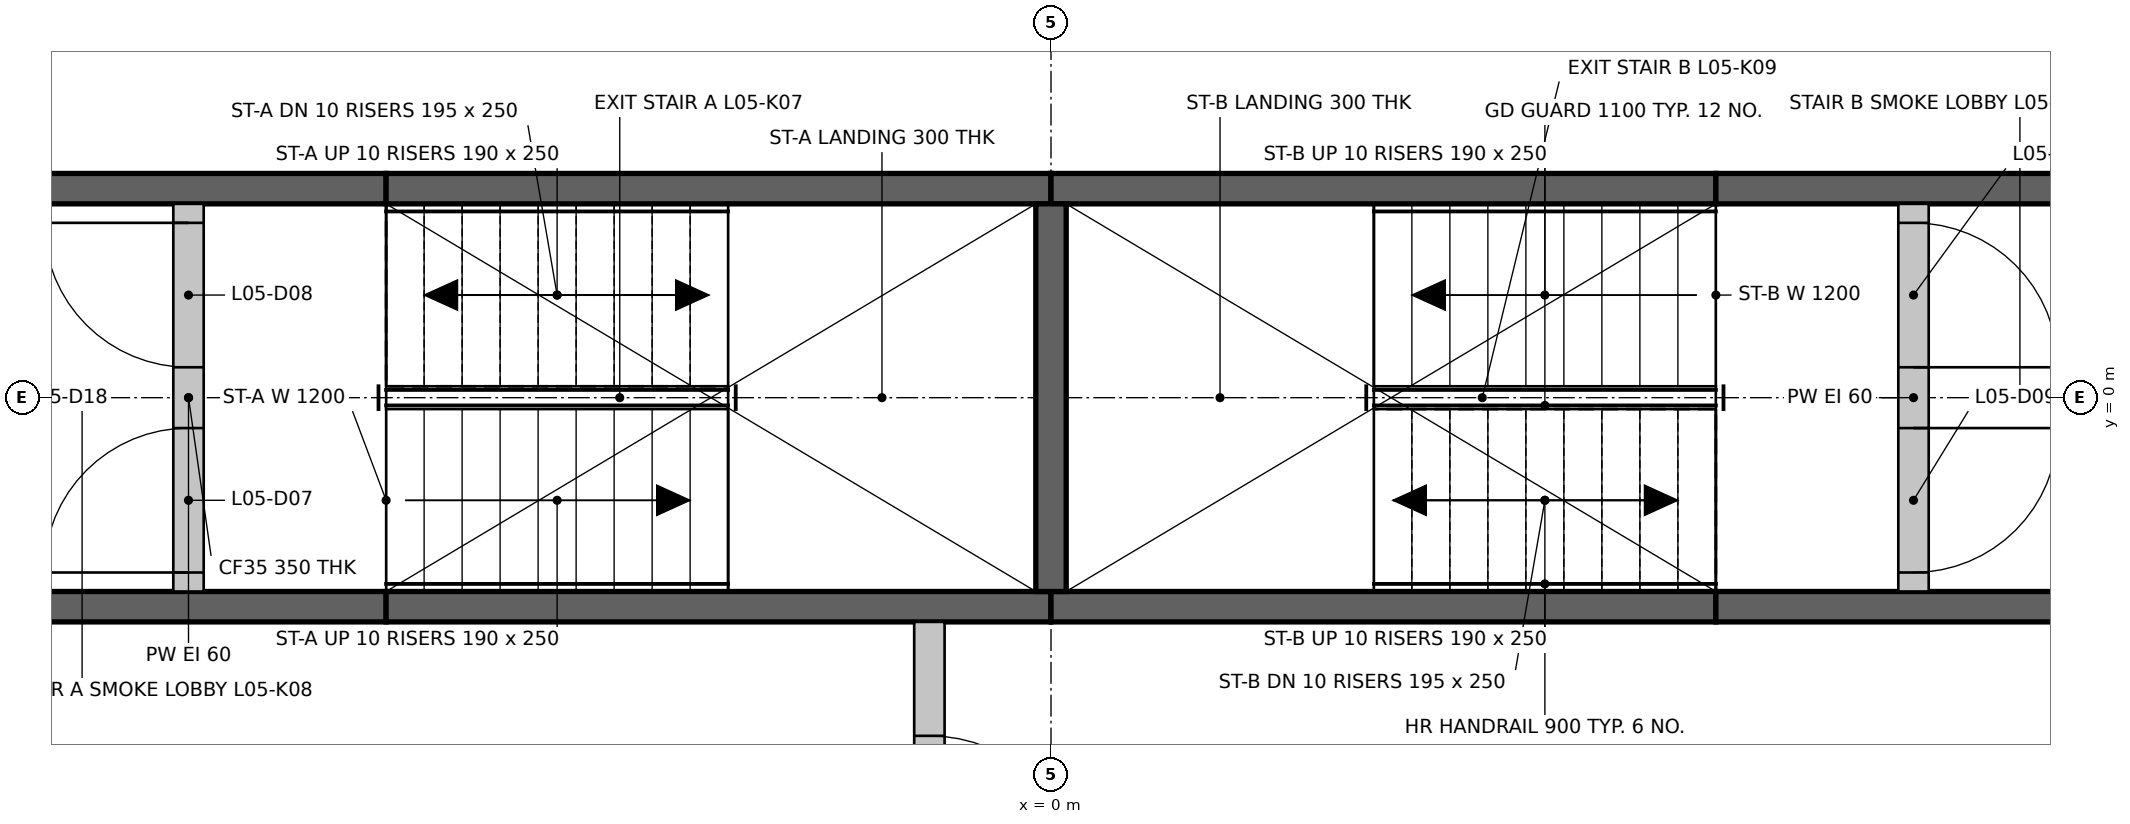
"""IFC4 building model, lengths in metres.
Left out: names, types, materials, properties, quantities, classifications, styles, units other than length and angle.
Written with IfcOpenShell. Run it as: python <this file> out.ifc"""

import sys

from ifc_helpers import new_model, si_unit, direction, frame, frame_2d, origin, place, context, subcontext, project, spatial, rectangle, extrude, element, fill, save


model = new_model("IFC4")
c1 = context("Model", 3, precision=1e-05, world=origin(), true_north=direction((0.0, 1.0)))
c2 = subcontext(c1, "Body", "Model", "MODEL_VIEW")
j1 = project(units=[si_unit("LENGTHUNIT", "METRE"), si_unit("PLANEANGLEUNIT", "RADIAN")], contexts=[c1])
p1 = place(None, origin())
s1 = spatial("IfcSite", under=j1, at=p1, CompositionType="ELEMENT")
p2 = place(p1, origin())
s2 = spatial("IfcBuilding", under=s1, at=p2, CompositionType="ELEMENT")
p3 = place(p2, frame((0.0, 0.0, 22.4)))
s3 = spatial("IfcBuildingStorey", under=s2, at=p3, CompositionType="ELEMENT", Elevation=22.4)
p4 = place(p3, frame((-6.974, -1.375, 0.0), z_axis=(0.0, 0.0, 1.0), x_axis=(1.0, 0.0, 0.0)))
e1 = element("IfcWall", 1, at=p4, inside=s3, PredefinedType="SHEAR", context=c2, shape_type="SweptSolid", body=[
    extrude(rectangle(XDim=2.6, YDim=0.2, at=frame_2d((1.3, 0.0))), origin(), (0.0, 0.0, 1.0), 3.45),
])
for number, where, z_axis, x_axis in (
    (2, (-4.374, -1.375, 0.0), (0.0, 0.0, 1.0), (1.0, 0.0, 0.0)),
    (3, (0.0, -1.375, 0.0), (0.0, 0.0, 1.0), (1.0, 0.0, 0.0)),
):
    element("IfcWall", number, at=place(p3, frame(where, z_axis=z_axis, x_axis=x_axis)), inside=s3, PredefinedType="SHEAR", context=c2, shape_type="SweptSolid", body=[
        extrude(rectangle(XDim=4.374, YDim=0.2, at=frame_2d((2.187, 0.0))), origin(), (0.0, 0.0, 1.0), 3.45),
    ])
for number, where, z_axis, x_axis in (
    (4, (4.374, -1.375, 0.0), (0.0, 0.0, 1.0), (1.0, 0.0, 0.0)),
    (5, (-6.974, 1.375, 0.0), (0.0, 0.0, 1.0), (1.0, 0.0, 0.0)),
):
    element("IfcWall", number, at=place(p3, frame(where, z_axis=z_axis, x_axis=x_axis)), inside=s3, PredefinedType="SHEAR", context=c2, shape_type="SweptSolid", body=[
        extrude(rectangle(XDim=2.6, YDim=0.2, at=frame_2d((1.3, 0.0))), origin(), (0.0, 0.0, 1.0), 3.45),
    ])
for number, where, z_axis, x_axis in (
    (6, (-4.374, 1.375, 0.0), (0.0, 0.0, 1.0), (1.0, 0.0, 0.0)),
    (7, (0.0, 1.375, 0.0), (0.0, 0.0, 1.0), (1.0, 0.0, 0.0)),
):
    element("IfcWall", number, at=place(p3, frame(where, z_axis=z_axis, x_axis=x_axis)), inside=s3, PredefinedType="SHEAR", context=c2, shape_type="SweptSolid", body=[
        extrude(rectangle(XDim=4.374, YDim=0.2, at=frame_2d((2.187, 0.0))), origin(), (0.0, 0.0, 1.0), 3.45),
    ])
p5 = place(p3, frame((4.374, 1.375, 0.0), z_axis=(0.0, 0.0, 1.0), x_axis=(1.0, 0.0, 0.0)))
e8 = element("IfcWall", 8, at=p5, inside=s3, PredefinedType="SHEAR", context=c2, shape_type="SweptSolid", body=[
    extrude(rectangle(XDim=2.6, YDim=0.2, at=frame_2d((1.3, 0.0))), origin(), (0.0, 0.0, 1.0), 3.45),
])
p6 = place(p3, frame((0.0, -1.275, 0.0), z_axis=(0.0, 0.0, 1.0), x_axis=(0.0, 1.0, 0.0)))
e9 = element("IfcWall", 9, at=p6, inside=s3, PredefinedType="SHEAR", context=c2, shape_type="SweptSolid", body=[
    extrude(rectangle(XDim=2.55, YDim=0.2, at=frame_2d((1.275, 0.0))), origin(), (0.0, 0.0, 1.0), 3.45),
])
p7 = place(p3, frame((-0.8, -3.974, 0.0), z_axis=(0.0, 0.0, 1.0), x_axis=(0.0, 1.0, 0.0)))
e10 = element("IfcWall", 10, at=p7, inside=s3, PredefinedType="PARTITIONING", context=c2, shape_type="SweptSolid", body=[
    extrude(rectangle(XDim=2.499, YDim=0.2, at=frame_2d((1.25, 0.0))), origin(), (0.0, 0.0, 1.0), 3.45),
])
p8 = place(p7, frame((0.75, 0.0, 0.0)))
e11 = element("IfcOpeningElement", 11, at=p8, cuts=e10, PredefinedType="OPENING", context=c2, shape_type="SweptSolid", body=[
    extrude(rectangle(XDim=1.0, YDim=2.1, at=frame_2d((0.5, 1.05))), frame((0.0, 0.11, 0.0), z_axis=(0.0, -1.0, 0.0), x_axis=(1.0, 0.0, 0.0)), (0.0, 0.0, 1.0), 0.22),
])
p9 = place(p3, frame((-5.674, -1.275, 0.0), z_axis=(0.0, 0.0, 1.0), x_axis=(0.0, 1.0, 0.0)))
e12 = element("IfcWall", 12, at=p9, inside=s3, PredefinedType="PARTITIONING", context=c2, shape_type="SweptSolid", body=[
    extrude(rectangle(XDim=2.55, YDim=0.2, at=frame_2d((1.275, 0.0))), origin(), (0.0, 0.0, 1.0), 3.45),
])
p10 = place(p9, frame((0.125, 0.0, 0.0)))
e13 = element("IfcOpeningElement", 13, at=p10, cuts=e12, PredefinedType="OPENING", context=c2, shape_type="SweptSolid", body=[
    extrude(rectangle(XDim=0.95, YDim=2.1, at=frame_2d((0.475, 1.05))), frame((0.0, 0.11, 0.0), z_axis=(0.0, -1.0, 0.0), x_axis=(1.0, 0.0, 0.0)), (0.0, 0.0, 1.0), 0.22),
])
p11 = place(p9, frame((1.475, 0.0, 0.0)))
e14 = element("IfcOpeningElement", 14, at=p11, cuts=e12, PredefinedType="OPENING", context=c2, shape_type="SweptSolid", body=[
    extrude(rectangle(XDim=0.95, YDim=2.1, at=frame_2d((0.475, 1.05))), frame((0.0, 0.11, 0.0), z_axis=(0.0, -1.0, 0.0), x_axis=(1.0, 0.0, 0.0)), (0.0, 0.0, 1.0), 0.22),
])
p12 = place(p3, frame((5.674, -1.275, 0.0), z_axis=(0.0, 0.0, 1.0), x_axis=(0.0, 1.0, 0.0)))
e15 = element("IfcWall", 15, at=p12, inside=s3, PredefinedType="PARTITIONING", context=c2, shape_type="SweptSolid", body=[
    extrude(rectangle(XDim=2.55, YDim=0.2, at=frame_2d((1.275, 0.0))), origin(), (0.0, 0.0, 1.0), 3.45),
])
p13 = place(p12, frame((0.125, 0.0, 0.0)))
e16 = element("IfcOpeningElement", 16, at=p13, cuts=e15, PredefinedType="OPENING", context=c2, shape_type="SweptSolid", body=[
    extrude(rectangle(XDim=0.95, YDim=2.1, at=frame_2d((0.475, 1.05))), frame((0.0, 0.11, 0.0), z_axis=(0.0, -1.0, 0.0), x_axis=(1.0, 0.0, 0.0)), (0.0, 0.0, 1.0), 0.22),
])
p14 = place(p12, frame((1.475, 0.0, 0.0)))
e17 = element("IfcOpeningElement", 17, at=p14, cuts=e15, PredefinedType="OPENING", context=c2, shape_type="SweptSolid", body=[
    extrude(rectangle(XDim=0.95, YDim=2.1, at=frame_2d((0.475, 1.05))), frame((0.0, 0.11, 0.0), z_axis=(0.0, -1.0, 0.0), x_axis=(1.0, 0.0, 0.0)), (0.0, 0.0, 1.0), 0.22),
])
p15 = place(p10, origin())
e18 = element("IfcDoor", 18, at=p15, inside=s3, OperationType="SINGLE_SWING_LEFT", PredefinedType="DOOR", context=c2, shape_type="SweptSolid", body=[
    extrude(rectangle(XDim=0.95, YDim=2.1, at=frame_2d((0.475, 1.05))), frame((0.0, 0.025, 0.0), z_axis=(0.0, -1.0, 0.0), x_axis=(1.0, 0.0, 0.0)), (0.0, 0.0, 1.0), 0.05),
])
fill(e13, e18)
p16 = place(p11, origin())
e19 = element("IfcDoor", 19, at=p16, inside=s3, OperationType="SINGLE_SWING_RIGHT", PredefinedType="DOOR", context=c2, shape_type="SweptSolid", body=[
    extrude(rectangle(XDim=0.95, YDim=2.1, at=frame_2d((0.475, 1.05))), frame((0.0, 0.025, 0.0), z_axis=(0.0, -1.0, 0.0), x_axis=(1.0, 0.0, 0.0)), (0.0, 0.0, 1.0), 0.05),
])
fill(e14, e19)
p17 = place(p13, frame((0.95, 0.0, 0.0), z_axis=(0.0, 0.0, 1.0), x_axis=(-1.0, 0.0, 0.0)))
e20 = element("IfcDoor", 20, at=p17, inside=s3, OperationType="SINGLE_SWING_RIGHT", PredefinedType="DOOR", context=c2, shape_type="SweptSolid", body=[
    extrude(rectangle(XDim=0.95, YDim=2.1, at=frame_2d((0.475, 1.05))), frame((0.0, 0.025, 0.0), z_axis=(0.0, -1.0, 0.0), x_axis=(1.0, 0.0, 0.0)), (0.0, 0.0, 1.0), 0.05),
])
fill(e16, e20)
p18 = place(p14, frame((0.95, 0.0, 0.0), z_axis=(0.0, 0.0, 1.0), x_axis=(-1.0, 0.0, 0.0)))
e21 = element("IfcDoor", 21, at=p18, inside=s3, OperationType="SINGLE_SWING_LEFT", PredefinedType="DOOR", context=c2, shape_type="SweptSolid", body=[
    extrude(rectangle(XDim=0.95, YDim=2.1, at=frame_2d((0.475, 1.05))), frame((0.0, 0.025, 0.0), z_axis=(0.0, -1.0, 0.0), x_axis=(1.0, 0.0, 0.0)), (0.0, 0.0, 1.0), 0.05),
])
fill(e17, e21)
p19 = place(p8, frame((1.0, 0.0, 0.0), z_axis=(0.0, 0.0, 1.0), x_axis=(-1.0, 0.0, 0.0)))
e22 = element("IfcDoor", 22, at=p19, inside=s3, OperationType="SINGLE_SWING_LEFT", PredefinedType="DOOR", context=c2, shape_type="SweptSolid", body=[
    extrude(rectangle(XDim=1.0, YDim=2.1, at=frame_2d((0.5, 1.05))), frame((0.0, 0.025, 0.0), z_axis=(0.0, -1.0, 0.0), x_axis=(1.0, 0.0, 0.0)), (0.0, 0.0, 1.0), 0.05),
])
fill(e11, e22)
save(model, sys.argv[1])
